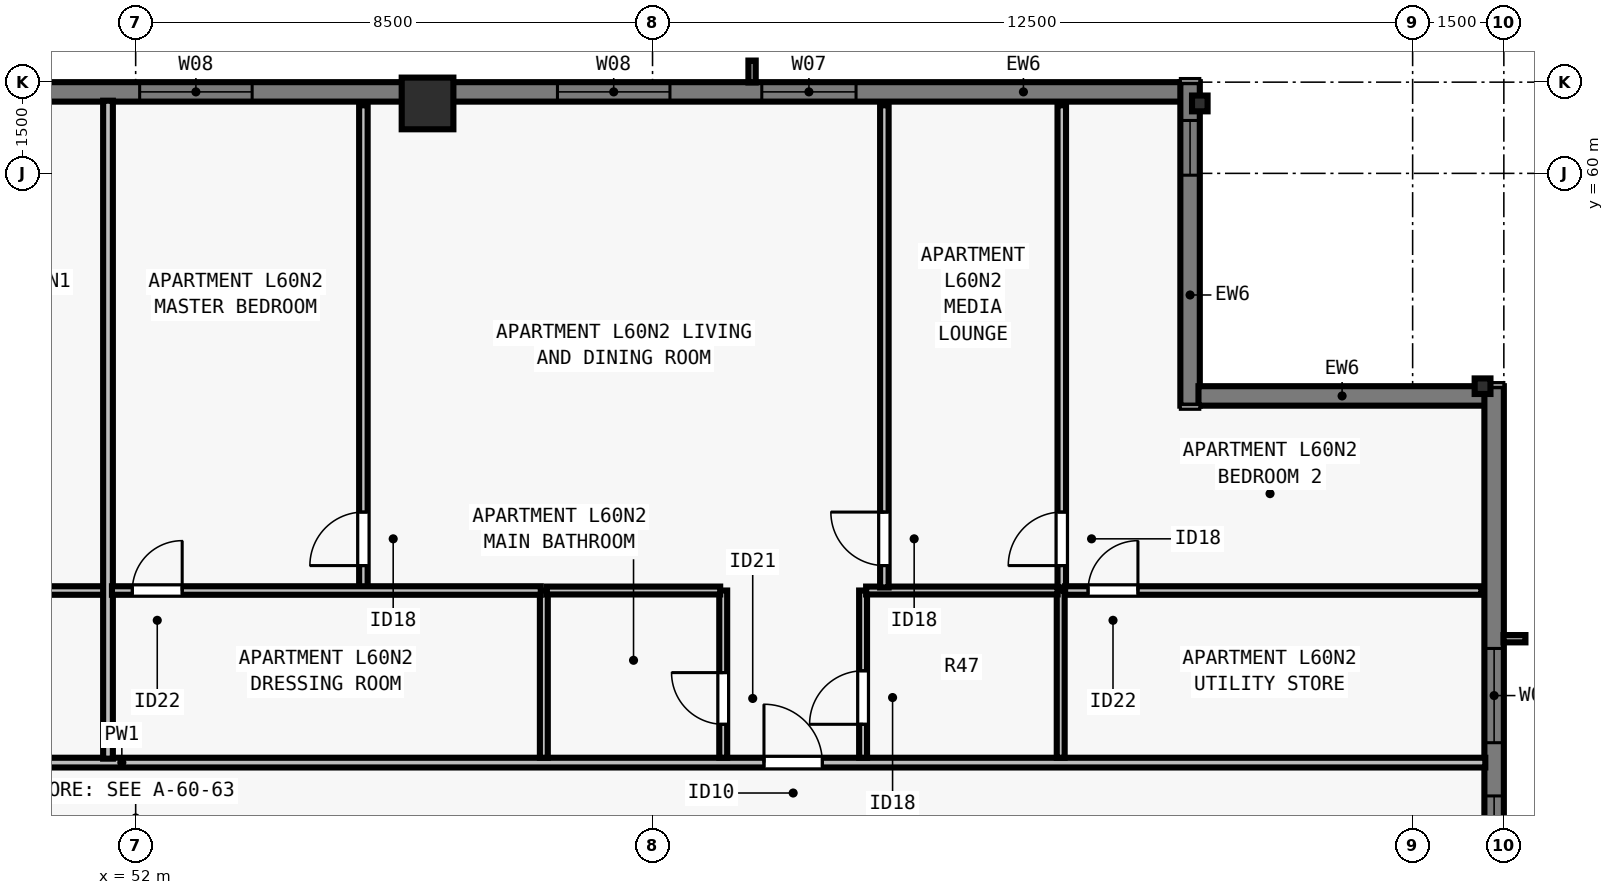
"""IFC4 building model, lengths in metres.
Left out: names, types, materials, properties, quantities, classifications, styles, units other than length and angle.
Written with IfcOpenShell. Run it as: python <this file> out.ifc"""

import sys

from ifc_helpers import new_model, si_unit, direction, frame, frame_2d, origin, origin_2d, place, context, subcontext, project, spatial, rectangle, i_section, extrude, element, fill, save


model = new_model("IFC4")
c1 = context("Model", 3, precision=1e-05, world=origin(), true_north=direction((0.0, 1.0)))
c2 = subcontext(c1, "Body", "Model", "MODEL_VIEW")
j1 = project(units=[si_unit("LENGTHUNIT", "METRE"), si_unit("PLANEANGLEUNIT", "RADIAN")], contexts=[c1])
p1 = place(None, origin())
s1 = spatial("IfcSite", under=j1, at=p1, CompositionType="ELEMENT")
p2 = place(p1, origin())
s2 = spatial("IfcBuilding", under=s1, at=p2, CompositionType="ELEMENT")
p3 = place(p2, frame((0.0, 0.0, 220.0)))
s3 = spatial("IfcBuildingStorey", under=s2, at=p3, CompositionType="ELEMENT", Elevation=220.0)
for number, where, z_axis, x_axis in (
    (1, (74.15, 56.5, 0.0), (0.0, 0.0, 1.0), (0.0, 1.0, 0.0)),
    (2, (69.5, 61.15, 0.0), (0.0, 0.0, 1.0), (1.0, 0.0, 0.0)),
):
    element("IfcColumn", number, at=place(p3, frame(where, z_axis=z_axis, x_axis=x_axis)), inside=s3, PredefinedType="COLUMN", context=c2, shape_type="SweptSolid", body=[
        extrude(i_section(OverallWidth=0.256, OverallDepth=0.26, WebThickness=0.01, FlangeThickness=0.017, FilletRadius=0.013, at=origin_2d()), origin(), (0.0, 0.0, 1.0), 3.5),
    ])
p4 = place(p3, frame((56.8, 61.15, 0.0), z_axis=(0.0, 0.0, 1.0), x_axis=(1.0, 0.0, 0.0)))
e3 = element("IfcColumn", 3, at=p4, inside=s3, PredefinedType="COLUMN", context=c2, shape_type="SweptSolid", body=[
    extrude(rectangle(XDim=0.85, YDim=0.85, at=origin_2d()), origin(), (0.0, 0.0, 1.0), 3.5),
])
p5 = place(p3, frame((45.8, 61.34, 0.0), z_axis=(0.0, 0.0, 1.0), x_axis=(1.0, 0.0, 0.0)))
e4 = element("IfcWall", 4, at=p5, inside=s3, PredefinedType="SOLIDWALL", context=c2, shape_type="SweptSolid", body=[
    extrude(rectangle(XDim=23.402, YDim=0.32, at=frame_2d((11.701, 0.0))), origin(), (0.0, 0.0, 1.0), 3.29),
])
p6 = place(p5, frame((2.305, 0.0, 0.8)))
e5 = element("IfcOpeningElement", 5, at=p6, cuts=e4, PredefinedType="OPENING", context=c2, shape_type="SweptSolid", body=[
    extrude(rectangle(XDim=1.55, YDim=1.678, at=frame_2d((0.775, 0.839))), frame((0.0, 0.17, 0.0), z_axis=(0.0, -1.0, 0.0), x_axis=(1.0, 0.0, 0.0)), (0.0, 0.0, 1.0), 0.34),
])
p7 = place(p5, frame((6.266, 0.0, 0.8)))
e6 = element("IfcOpeningElement", 6, at=p7, cuts=e4, PredefinedType="OPENING", context=c2, shape_type="SweptSolid", body=[
    extrude(rectangle(XDim=1.85, YDim=1.678, at=frame_2d((0.925, 0.839))), frame((0.0, 0.17, 0.0), z_axis=(0.0, -1.0, 0.0), x_axis=(1.0, 0.0, 0.0)), (0.0, 0.0, 1.0), 0.34),
])
p8 = place(p5, frame((13.136, 0.0, 0.8)))
e7 = element("IfcOpeningElement", 7, at=p8, cuts=e4, PredefinedType="OPENING", context=c2, shape_type="SweptSolid", body=[
    extrude(rectangle(XDim=1.85, YDim=1.678, at=frame_2d((0.925, 0.839))), frame((0.0, 0.17, 0.0), z_axis=(0.0, -1.0, 0.0), x_axis=(1.0, 0.0, 0.0)), (0.0, 0.0, 1.0), 0.34),
])
p9 = place(p5, frame((16.497, 0.0, 0.8)))
e8 = element("IfcOpeningElement", 8, at=p9, cuts=e4, PredefinedType="OPENING", context=c2, shape_type="SweptSolid", body=[
    extrude(rectangle(XDim=1.55, YDim=1.678, at=frame_2d((0.775, 0.839))), frame((0.0, 0.17, 0.0), z_axis=(0.0, -1.0, 0.0), x_axis=(1.0, 0.0, 0.0)), (0.0, 0.0, 1.0), 0.34),
])
p10 = place(p3, frame((69.34, 61.5, 0.0), z_axis=(0.0, 0.0, 1.0), x_axis=(0.0, -1.0, 0.0)))
e9 = element("IfcWall", 9, at=p10, inside=s3, PredefinedType="SOLIDWALL", context=c2, shape_type="SweptSolid", body=[
    extrude(rectangle(XDim=5.32, YDim=0.32, at=frame_2d((2.66, 0.0))), origin(), (0.0, 0.0, 1.0), 3.29),
])
p11 = place(p10, frame((0.63, 0.0, 0.8)))
e10 = element("IfcOpeningElement", 10, at=p11, cuts=e9, PredefinedType="OPENING", context=c2, shape_type="SweptSolid", body=[
    extrude(rectangle(XDim=0.9, YDim=1.678, at=frame_2d((0.45, 0.839))), frame((0.0, 0.17, 0.0), z_axis=(0.0, -1.0, 0.0), x_axis=(1.0, 0.0, 0.0)), (0.0, 0.0, 1.0), 0.34),
])
p12 = place(p3, frame((69.478, 56.34, 0.0), z_axis=(0.0, 0.0, 1.0), x_axis=(1.0, 0.0, 0.0)))
e11 = element("IfcWall", 11, at=p12, inside=s3, PredefinedType="SOLIDWALL", context=c2, shape_type="SweptSolid", body=[
    extrude(rectangle(XDim=4.724, YDim=0.32, at=frame_2d((2.362, 0.0))), origin(), (0.0, 0.0, 1.0), 3.29),
])
p13 = place(p3, frame((74.34, 56.5, 0.0), z_axis=(0.0, 0.0, 1.0), x_axis=(0.0, -1.0, 0.0)))
e12 = element("IfcWall", 12, at=p13, inside=s3, PredefinedType="SOLIDWALL", context=c2, shape_type="SweptSolid", body=[
    extrude(rectangle(XDim=34.702, YDim=0.32, at=frame_2d((17.351, 0.0))), origin(), (0.0, 0.0, 1.0), 3.29),
])
p14 = place(p13, frame((4.312, 0.0, 0.8)))
e13 = element("IfcOpeningElement", 13, at=p14, cuts=e12, PredefinedType="OPENING", context=c2, shape_type="SweptSolid", body=[
    extrude(rectangle(XDim=1.55, YDim=1.678, at=frame_2d((0.775, 0.839))), frame((0.0, 0.17, 0.0), z_axis=(0.0, -1.0, 0.0), x_axis=(1.0, 0.0, 0.0)), (0.0, 0.0, 1.0), 0.34),
])
p15 = place(p13, frame((6.738, 0.0, 0.8)))
e14 = element("IfcOpeningElement", 14, at=p15, cuts=e12, PredefinedType="OPENING", context=c2, shape_type="SweptSolid", body=[
    extrude(rectangle(XDim=1.85, YDim=1.678, at=frame_2d((0.925, 0.839))), frame((0.0, 0.17, 0.0), z_axis=(0.0, -1.0, 0.0), x_axis=(1.0, 0.0, 0.0)), (0.0, 0.0, 1.0), 0.34),
])
p16 = place(p13, frame((10.263, 0.0, 0.8)))
e15 = element("IfcOpeningElement", 15, at=p16, cuts=e12, PredefinedType="OPENING", context=c2, shape_type="SweptSolid", body=[
    extrude(rectangle(XDim=1.55, YDim=1.678, at=frame_2d((0.775, 0.839))), frame((0.0, 0.17, 0.0), z_axis=(0.0, -1.0, 0.0), x_axis=(1.0, 0.0, 0.0)), (0.0, 0.0, 1.0), 0.34),
])
p17 = place(p13, frame((13.488, 0.0, 0.8)))
e16 = element("IfcOpeningElement", 16, at=p17, cuts=e12, PredefinedType="OPENING", context=c2, shape_type="SweptSolid", body=[
    extrude(rectangle(XDim=1.85, YDim=1.678, at=frame_2d((0.925, 0.839))), frame((0.0, 0.17, 0.0), z_axis=(0.0, -1.0, 0.0), x_axis=(1.0, 0.0, 0.0)), (0.0, 0.0, 1.0), 0.34),
])
p18 = place(p13, frame((18.264, 0.0, 0.8)))
e17 = element("IfcOpeningElement", 17, at=p18, cuts=e12, PredefinedType="OPENING", context=c2, shape_type="SweptSolid", body=[
    extrude(rectangle(XDim=1.55, YDim=1.678, at=frame_2d((0.775, 0.839))), frame((0.0, 0.17, 0.0), z_axis=(0.0, -1.0, 0.0), x_axis=(1.0, 0.0, 0.0)), (0.0, 0.0, 1.0), 0.34),
])
p19 = place(p13, frame((24.164, 0.0, 0.8)))
e18 = element("IfcOpeningElement", 18, at=p19, cuts=e12, PredefinedType="OPENING", context=c2, shape_type="SweptSolid", body=[
    extrude(rectangle(XDim=1.55, YDim=1.678, at=frame_2d((0.775, 0.839))), frame((0.0, 0.17, 0.0), z_axis=(0.0, -1.0, 0.0), x_axis=(1.0, 0.0, 0.0)), (0.0, 0.0, 1.0), 0.34),
])
p20 = place(p3, frame((29.805, 50.31, 0.0), z_axis=(0.0, 0.0, 1.0), x_axis=(1.0, 0.0, 0.0)))
e19 = element("IfcWall", 19, at=p20, inside=s3, PredefinedType="PARTITIONING", context=c2, shape_type="SweptSolid", body=[
    extrude(rectangle(XDim=44.39, YDim=0.16, at=frame_2d((22.195, 0.0))), origin(), (0.0, 0.0, 1.0), 2.958),
])
p21 = place(p20, frame((10.448, 0.0, 0.0)))
e20 = element("IfcOpeningElement", 20, at=p21, cuts=e19, PredefinedType="OPENING", context=c2, shape_type="SweptSolid", body=[
    extrude(rectangle(XDim=0.96, YDim=2.18, at=frame_2d((0.48, 1.09))), frame((0.0, 0.09, 0.0), z_axis=(0.0, -1.0, 0.0), x_axis=(1.0, 0.0, 0.0)), (0.0, 0.0, 1.0), 0.18),
])
p22 = place(p20, frame((32.528, 0.0, 0.0)))
e21 = element("IfcOpeningElement", 21, at=p22, cuts=e19, PredefinedType="OPENING", context=c2, shape_type="SweptSolid", body=[
    extrude(rectangle(XDim=0.96, YDim=2.18, at=frame_2d((0.48, 1.09))), frame((0.0, 0.09, 0.0), z_axis=(0.0, -1.0, 0.0), x_axis=(1.0, 0.0, 0.0)), (0.0, 0.0, 1.0), 0.18),
])
p23 = place(p3, frame((45.183, 53.14, 0.0), z_axis=(0.0, 0.0, 1.0), x_axis=(1.0, 0.0, 0.0)))
e22 = element("IfcWall", 22, at=p23, inside=s3, PredefinedType="PARTITIONING", context=c2, shape_type="SweptSolid", body=[
    extrude(rectangle(XDim=6.412, YDim=0.14, at=frame_2d((3.206, 0.0))), origin(), (0.0, 0.0, 1.0), 3.29),
])
p24 = place(p23, frame((0.4, 0.0, 0.0)))
e23 = element("IfcOpeningElement", 23, at=p24, cuts=e22, PredefinedType="OPENING", context=c2, shape_type="SweptSolid", body=[
    extrude(rectangle(XDim=0.82, YDim=2.1, at=frame_2d((0.41, 1.05))), frame((0.0, 0.08, 0.0), z_axis=(0.0, -1.0, 0.0), x_axis=(1.0, 0.0, 0.0)), (0.0, 0.0, 1.0), 0.16),
])
p25 = place(p3, frame((51.545, 50.375, 0.0), z_axis=(0.0, 0.0, 1.0), x_axis=(0.0, 1.0, 0.0)))
e24 = element("IfcWall", 24, at=p25, inside=s3, PredefinedType="PARTITIONING", context=c2, shape_type="SweptSolid", body=[
    extrude(rectangle(XDim=10.82, YDim=0.16, at=frame_2d((5.41, 0.0))), origin(), (0.0, 0.0, 1.0), 2.958),
])
p26 = place(p3, frame((58.712, 50.39, 0.0), z_axis=(0.0, 0.0, 1.0), x_axis=(0.0, 1.0, 0.0)))
e25 = element("IfcWall", 25, at=p26, inside=s3, PredefinedType="PLUMBINGWALL", context=c2, shape_type="SweptSolid", body=[
    extrude(rectangle(XDim=2.75, YDim=0.13, at=frame_2d((1.375, 0.0))), origin(), (0.0, 0.0, 1.0), 3.29),
])
p27 = place(p3, frame((61.663, 50.39, 0.0), z_axis=(0.0, 0.0, 1.0), x_axis=(0.0, 1.0, 0.0)))
e26 = element("IfcWall", 26, at=p27, inside=s3, PredefinedType="PLUMBINGWALL", context=c2, shape_type="SweptSolid", body=[
    extrude(rectangle(XDim=2.75, YDim=0.13, at=frame_2d((1.375, 0.0))), origin(), (0.0, 0.0, 1.0), 3.29),
])
p28 = place(p27, frame((0.55, 0.0, 0.0)))
e27 = element("IfcOpeningElement", 27, at=p28, cuts=e26, PredefinedType="OPENING", context=c2, shape_type="SweptSolid", body=[
    extrude(rectangle(XDim=0.85, YDim=2.08, at=frame_2d((0.425, 1.04))), frame((0.0, 0.075, 0.0), z_axis=(0.0, -1.0, 0.0), x_axis=(1.0, 0.0, 0.0)), (0.0, 0.0, 1.0), 0.15),
])
p29 = place(p3, frame((58.762, 53.14, 0.0), z_axis=(0.0, 0.0, 1.0), x_axis=(1.0, 0.0, 0.0)))
e28 = element("IfcWall", 28, at=p29, inside=s3, PredefinedType="PLUMBINGWALL", context=c2, shape_type="SweptSolid", body=[
    extrude(rectangle(XDim=2.85, YDim=0.13, at=frame_2d((1.425, 0.0))), origin(), (0.0, 0.0, 1.0), 3.29),
])
p30 = place(p3, frame((67.212, 50.39, 0.0), z_axis=(0.0, 0.0, 1.0), x_axis=(0.0, 1.0, 0.0)))
e29 = element("IfcWall", 29, at=p30, inside=s3, PredefinedType="PLUMBINGWALL", context=c2, shape_type="SweptSolid", body=[
    extrude(rectangle(XDim=2.75, YDim=0.13, at=frame_2d((1.375, 0.0))), origin(), (0.0, 0.0, 1.0), 3.29),
])
p31 = place(p3, frame((63.962, 50.39, 0.0), z_axis=(0.0, 0.0, 1.0), x_axis=(0.0, 1.0, 0.0)))
e30 = element("IfcWall", 30, at=p31, inside=s3, PredefinedType="PLUMBINGWALL", context=c2, shape_type="SweptSolid", body=[
    extrude(rectangle(XDim=2.75, YDim=0.13, at=frame_2d((1.375, 0.0))), origin(), (0.0, 0.0, 1.0), 2.573),
])
p32 = place(p31, frame((0.55, 0.0, 0.0)))
e31 = element("IfcOpeningElement", 31, at=p32, cuts=e30, PredefinedType="OPENING", context=c2, shape_type="SweptSolid", body=[
    extrude(rectangle(XDim=0.88, YDim=2.1, at=frame_2d((0.44, 1.05))), frame((0.0, 0.075, 0.0), z_axis=(0.0, -1.0, 0.0), x_axis=(1.0, 0.0, 0.0)), (0.0, 0.0, 1.0), 0.15),
])
p33 = place(p3, frame((64.012, 53.14, 0.0), z_axis=(0.0, 0.0, 1.0), x_axis=(1.0, 0.0, 0.0)))
e32 = element("IfcWall", 32, at=p33, inside=s3, PredefinedType="PLUMBINGWALL", context=c2, shape_type="SweptSolid", body=[
    extrude(rectangle(XDim=3.15, YDim=0.13, at=frame_2d((1.575, 0.0))), origin(), (0.0, 0.0, 1.0), 3.29),
])
p34 = place(p3, frame((55.745, 53.1, 0.0), z_axis=(0.0, 0.0, 1.0), x_axis=(0.0, 1.0, 0.0)))
e33 = element("IfcWall", 33, at=p34, inside=s3, PredefinedType="PARTITIONING", context=c2, shape_type="SweptSolid", body=[
    extrude(rectangle(XDim=8.02, YDim=0.14, at=frame_2d((4.01, 0.0))), origin(), (0.0, 0.0, 1.0), 2.958),
])
p35 = place(p34, frame((0.45, 0.0, 0.0)))
e34 = element("IfcOpeningElement", 34, at=p35, cuts=e33, PredefinedType="OPENING", context=c2, shape_type="SweptSolid", body=[
    extrude(rectangle(XDim=0.88, YDim=2.1, at=frame_2d((0.44, 1.05))), frame((0.0, 0.08, 0.0), z_axis=(0.0, -1.0, 0.0), x_axis=(1.0, 0.0, 0.0)), (0.0, 0.0, 1.0), 0.16),
])
p36 = place(p3, frame((51.61, 53.14, 0.0), z_axis=(0.0, 0.0, 1.0), x_axis=(1.0, 0.0, 0.0)))
e35 = element("IfcWall", 35, at=p36, inside=s3, PredefinedType="PARTITIONING", context=c2, shape_type="SweptSolid", body=[
    extrude(rectangle(XDim=7.052, YDim=0.14, at=frame_2d((3.526, 0.0))), origin(), (0.0, 0.0, 1.0), 3.29),
])
p37 = place(p36, frame((0.335, 0.0, 0.0)))
e36 = element("IfcOpeningElement", 36, at=p37, cuts=e35, PredefinedType="OPENING", context=c2, shape_type="SweptSolid", body=[
    extrude(rectangle(XDim=0.82, YDim=2.1, at=frame_2d((0.41, 1.05))), frame((0.0, 0.08, 0.0), z_axis=(0.0, -1.0, 0.0), x_axis=(1.0, 0.0, 0.0)), (0.0, 0.0, 1.0), 0.16),
])
p38 = place(p3, frame((67.23, 53.19, 0.0), z_axis=(0.0, 0.0, 1.0), x_axis=(0.0, 1.0, 0.0)))
e37 = element("IfcWall", 37, at=p38, inside=s3, PredefinedType="PARTITIONING", context=c2, shape_type="SweptSolid", body=[
    extrude(rectangle(XDim=7.93, YDim=0.14, at=frame_2d((3.965, 0.0))), origin(), (0.0, 0.0, 1.0), 2.573),
])
p39 = place(p38, frame((0.36, 0.0, 0.0)))
e38 = element("IfcOpeningElement", 38, at=p39, cuts=e37, PredefinedType="OPENING", context=c2, shape_type="SweptSolid", body=[
    extrude(rectangle(XDim=0.88, YDim=2.1, at=frame_2d((0.44, 1.05))), frame((0.0, 0.08, 0.0), z_axis=(0.0, -1.0, 0.0), x_axis=(1.0, 0.0, 0.0)), (0.0, 0.0, 1.0), 0.16),
])
p40 = place(p3, frame((67.285, 53.14, 0.0), z_axis=(0.0, 0.0, 1.0), x_axis=(1.0, 0.0, 0.0)))
e39 = element("IfcWall", 39, at=p40, inside=s3, PredefinedType="PARTITIONING", context=c2, shape_type="SweptSolid", body=[
    extrude(rectangle(XDim=6.845, YDim=0.14, at=frame_2d((3.422, 0.0))), origin(), (0.0, 0.0, 1.0), 2.958),
])
p41 = place(p40, frame((0.377, 0.0, 0.0)))
e40 = element("IfcOpeningElement", 40, at=p41, cuts=e39, PredefinedType="OPENING", context=c2, shape_type="SweptSolid", body=[
    extrude(rectangle(XDim=0.82, YDim=2.1, at=frame_2d((0.41, 1.05))), frame((0.0, 0.08, 0.0), z_axis=(0.0, -1.0, 0.0), x_axis=(1.0, 0.0, 0.0)), (0.0, 0.0, 1.0), 0.16),
])
p42 = place(p3, frame((64.312, 53.19, 0.0), z_axis=(0.0, 0.0, 1.0), x_axis=(0.0, 1.0, 0.0)))
e41 = element("IfcWall", 41, at=p42, inside=s3, PredefinedType="PARTITIONING", context=c2, shape_type="SweptSolid", body=[
    extrude(rectangle(XDim=7.93, YDim=0.14, at=frame_2d((3.965, 0.0))), origin(), (0.0, 0.0, 1.0), 2.573),
])
p43 = place(p42, frame((0.36, 0.0, 0.0)))
e42 = element("IfcOpeningElement", 42, at=p43, cuts=e41, PredefinedType="OPENING", context=c2, shape_type="SweptSolid", body=[
    extrude(rectangle(XDim=0.88, YDim=2.1, at=frame_2d((0.44, 1.05))), frame((0.0, 0.08, 0.0), z_axis=(0.0, -1.0, 0.0), x_axis=(1.0, 0.0, 0.0)), (0.0, 0.0, 1.0), 0.16),
])
p44 = place(p7, origin())
e43 = element("IfcWindow", 43, at=p44, inside=s3, PartitioningType="SINGLE_PANEL", PredefinedType="WINDOW", context=c2, shape_type="SweptSolid", body=[
    extrude(rectangle(XDim=1.85, YDim=1.678, at=frame_2d((0.925, 0.839))), frame((0.0, -0.05, 0.0), z_axis=(0.0, -1.0, 0.0), x_axis=(1.0, 0.0, 0.0)), (0.0, 0.0, 1.0), 0.06),
])
fill(e6, e43)
p45 = place(p8, origin())
e44 = element("IfcWindow", 44, at=p45, inside=s3, PartitioningType="SINGLE_PANEL", PredefinedType="WINDOW", context=c2, shape_type="SweptSolid", body=[
    extrude(rectangle(XDim=1.85, YDim=1.678, at=frame_2d((0.925, 0.839))), frame((0.0, -0.05, 0.0), z_axis=(0.0, -1.0, 0.0), x_axis=(1.0, 0.0, 0.0)), (0.0, 0.0, 1.0), 0.06),
])
fill(e7, e44)
p46 = place(p9, origin())
e45 = element("IfcWindow", 45, at=p46, inside=s3, PartitioningType="SINGLE_PANEL", PredefinedType="WINDOW", context=c2, shape_type="SweptSolid", body=[
    extrude(rectangle(XDim=1.55, YDim=1.678, at=frame_2d((0.775, 0.839))), frame((0.0, -0.05, 0.0), z_axis=(0.0, -1.0, 0.0), x_axis=(1.0, 0.0, 0.0)), (0.0, 0.0, 1.0), 0.06),
])
fill(e8, e45)
p47 = place(p14, origin())
e46 = element("IfcWindow", 46, at=p47, inside=s3, PartitioningType="SINGLE_PANEL", PredefinedType="WINDOW", context=c2, shape_type="SweptSolid", body=[
    extrude(rectangle(XDim=1.55, YDim=1.678, at=frame_2d((0.775, 0.839))), frame((0.0, -0.05, 0.0), z_axis=(0.0, -1.0, 0.0), x_axis=(1.0, 0.0, 0.0)), (0.0, 0.0, 1.0), 0.06),
])
fill(e13, e46)
p48 = place(p15, origin())
e47 = element("IfcWindow", 47, at=p48, inside=s3, PartitioningType="SINGLE_PANEL", PredefinedType="WINDOW", context=c2, shape_type="SweptSolid", body=[
    extrude(rectangle(XDim=1.85, YDim=1.678, at=frame_2d((0.925, 0.839))), frame((0.0, -0.05, 0.0), z_axis=(0.0, -1.0, 0.0), x_axis=(1.0, 0.0, 0.0)), (0.0, 0.0, 1.0), 0.06),
])
fill(e14, e47)
p49 = place(p11, origin())
e48 = element("IfcWindow", 48, at=p49, inside=s3, PartitioningType="SINGLE_PANEL", PredefinedType="WINDOW", context=c2, shape_type="SweptSolid", body=[
    extrude(rectangle(XDim=0.9, YDim=1.678, at=frame_2d((0.45, 0.839))), frame((0.0, -0.04, 0.0), z_axis=(0.0, -1.0, 0.0), x_axis=(1.0, 0.0, 0.0)), (0.0, 0.0, 1.0), 0.06),
])
fill(e10, e48)
p50 = place(p28, origin())
e49 = element("IfcDoor", 49, at=p50, inside=s3, OperationType="SINGLE_SWING_RIGHT", PredefinedType="DOOR", context=c2, shape_type="SweptSolid", body=[
    extrude(rectangle(XDim=0.85, YDim=2.08, at=frame_2d((0.425, 1.04))), frame((0.0, 0.025, 0.0), z_axis=(0.0, -1.0, 0.0), x_axis=(1.0, 0.0, 0.0)), (0.0, 0.0, 1.0), 0.05),
])
fill(e27, e49)
p51 = place(p32, origin())
e50 = element("IfcDoor", 50, at=p51, inside=s3, OperationType="SINGLE_SWING_LEFT", PredefinedType="DOOR", context=c2, shape_type="SweptSolid", body=[
    extrude(rectangle(XDim=0.88, YDim=2.1, at=frame_2d((0.44, 1.05))), frame((0.0, 0.025, 0.0), z_axis=(0.0, -1.0, 0.0), x_axis=(1.0, 0.0, 0.0)), (0.0, 0.0, 1.0), 0.05),
])
fill(e31, e50)
p52 = place(p37, origin())
e51 = element("IfcDoor", 51, at=p52, inside=s3, OperationType="SINGLE_SWING_RIGHT", PredefinedType="DOOR", context=c2, shape_type="SweptSolid", body=[
    extrude(rectangle(XDim=0.82, YDim=2.1, at=frame_2d((0.41, 1.05))), frame((0.0, 0.025, 0.0), z_axis=(0.0, -1.0, 0.0), x_axis=(1.0, 0.0, 0.0)), (0.0, 0.0, 1.0), 0.05),
])
fill(e36, e51)
p53 = place(p35, origin())
e52 = element("IfcDoor", 52, at=p53, inside=s3, OperationType="SINGLE_SWING_LEFT", PredefinedType="DOOR", context=c2, shape_type="SweptSolid", body=[
    extrude(rectangle(XDim=0.88, YDim=2.1, at=frame_2d((0.44, 1.05))), frame((0.0, 0.025, 0.0), z_axis=(0.0, -1.0, 0.0), x_axis=(1.0, 0.0, 0.0)), (0.0, 0.0, 1.0), 0.05),
])
fill(e34, e52)
p54 = place(p41, origin())
e53 = element("IfcDoor", 53, at=p54, inside=s3, OperationType="SINGLE_SWING_RIGHT", PredefinedType="DOOR", context=c2, shape_type="SweptSolid", body=[
    extrude(rectangle(XDim=0.82, YDim=2.1, at=frame_2d((0.41, 1.05))), frame((0.0, 0.025, 0.0), z_axis=(0.0, -1.0, 0.0), x_axis=(1.0, 0.0, 0.0)), (0.0, 0.0, 1.0), 0.05),
])
fill(e40, e53)
p55 = place(p39, origin())
e54 = element("IfcDoor", 54, at=p55, inside=s3, OperationType="SINGLE_SWING_LEFT", PredefinedType="DOOR", context=c2, shape_type="SweptSolid", body=[
    extrude(rectangle(XDim=0.88, YDim=2.1, at=frame_2d((0.44, 1.05))), frame((0.0, 0.025, 0.0), z_axis=(0.0, -1.0, 0.0), x_axis=(1.0, 0.0, 0.0)), (0.0, 0.0, 1.0), 0.05),
])
fill(e38, e54)
p56 = place(p43, origin())
e55 = element("IfcDoor", 55, at=p56, inside=s3, OperationType="SINGLE_SWING_RIGHT", PredefinedType="DOOR", context=c2, shape_type="SweptSolid", body=[
    extrude(rectangle(XDim=0.88, YDim=2.1, at=frame_2d((0.44, 1.05))), frame((0.0, 0.025, 0.0), z_axis=(0.0, -1.0, 0.0), x_axis=(1.0, 0.0, 0.0)), (0.0, 0.0, 1.0), 0.05),
])
fill(e42, e55)
p57 = place(p22, origin())
e56 = element("IfcDoor", 56, at=p57, inside=s3, OperationType="SINGLE_SWING_LEFT", PredefinedType="DOOR", context=c2, shape_type="SweptSolid", body=[
    extrude(rectangle(XDim=0.96, YDim=2.18, at=frame_2d((0.48, 1.09))), frame((0.0, 0.025, 0.0), z_axis=(0.0, -1.0, 0.0), x_axis=(1.0, 0.0, 0.0)), (0.0, 0.0, 1.0), 0.05),
])
fill(e21, e56)
save(model, sys.argv[1])
